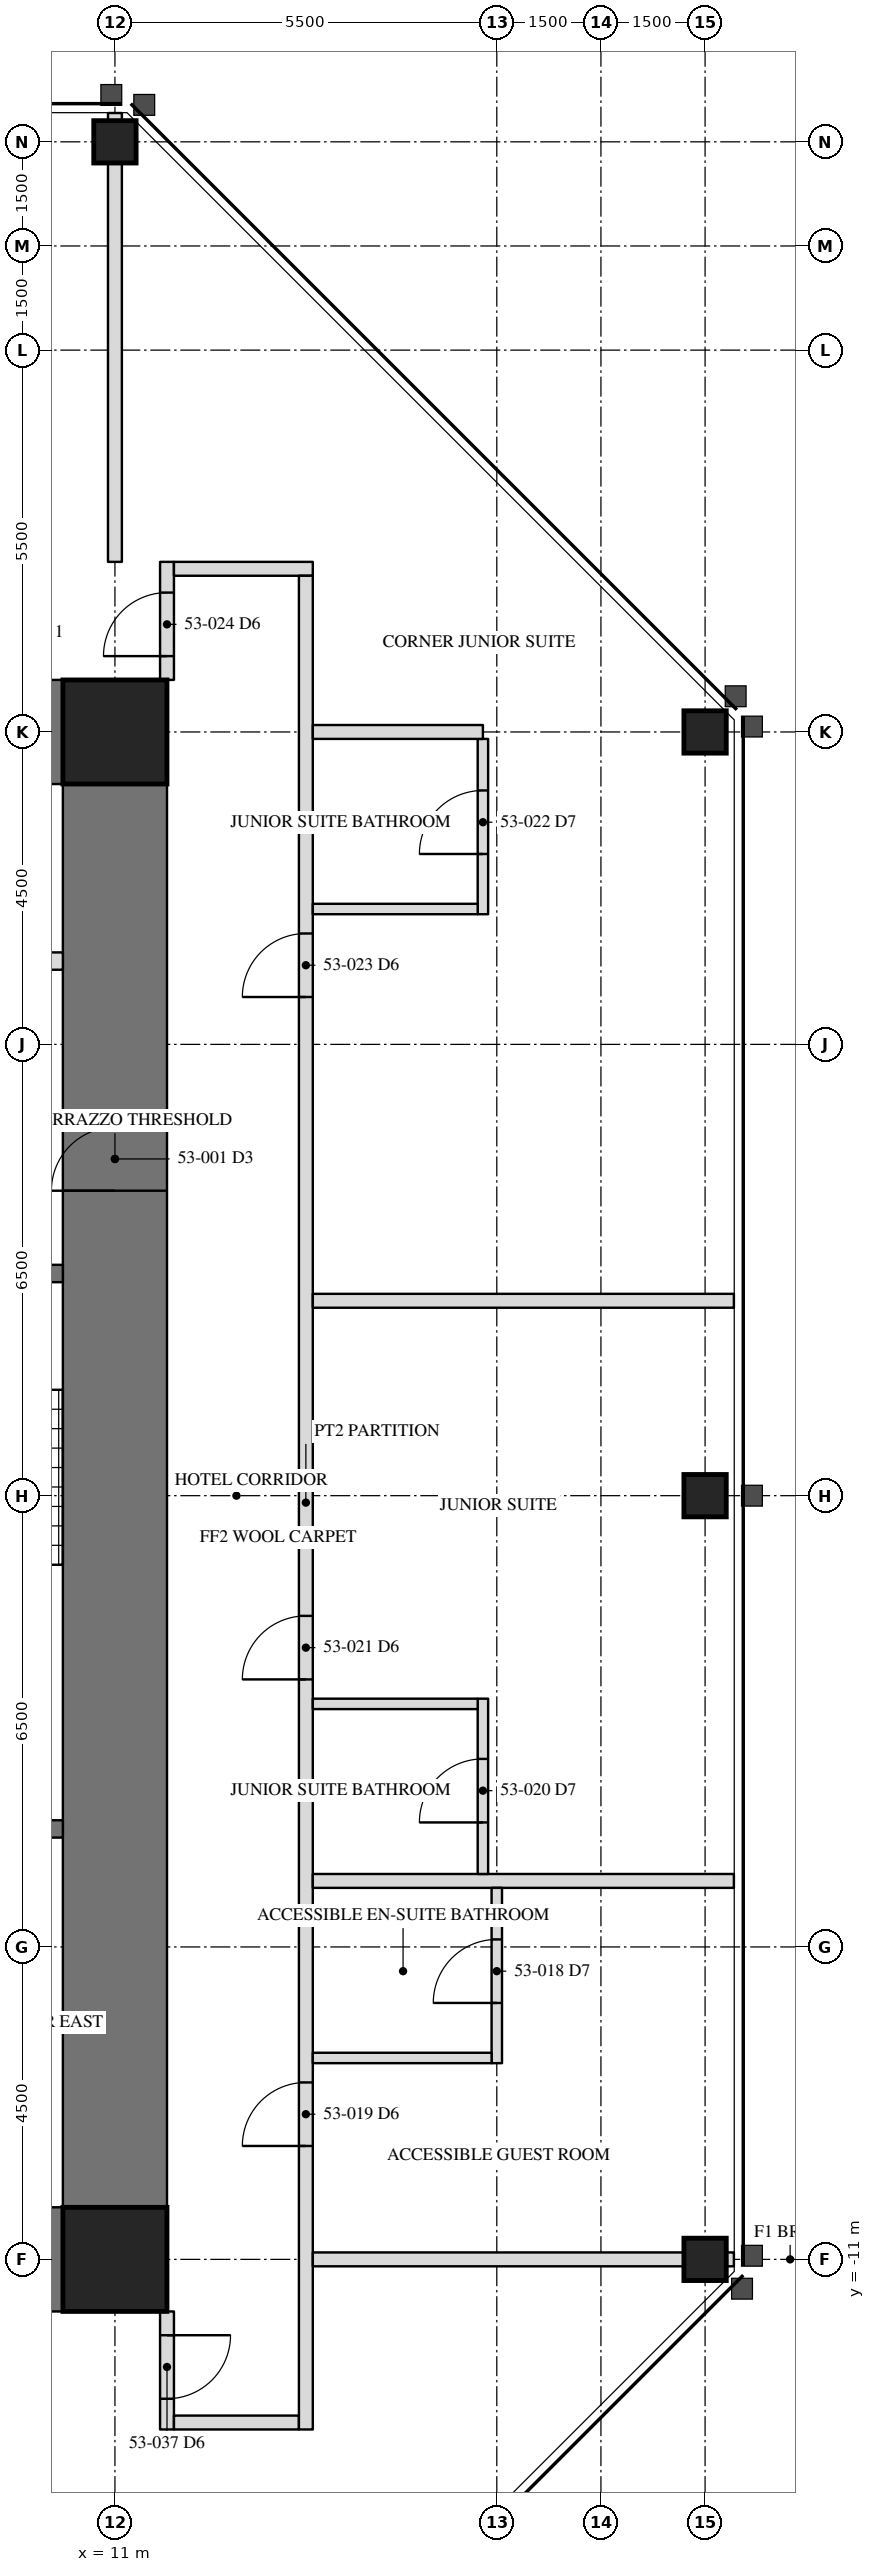
"""IFC4 building model, lengths in metres.
Left out: names, types, materials, properties, quantities, classifications, styles, units other than length and angle.
Written with IfcOpenShell. Run it as: python <this file> out.ifc"""

import sys

from ifc_helpers import new_model, si_unit, direction, frame, frame_2d, origin, origin_2d, place, context, subcontext, project, spatial, rectangle, hollow_rectangle, extrude, element, fill, save


model = new_model("IFC4")
c1 = context("Model", 3, precision=1e-05, world=origin(), true_north=direction((0.0, 1.0)))
c2 = subcontext(c1, "Body", "Model", "MODEL_VIEW")
j1 = project(units=[si_unit("LENGTHUNIT", "METRE"), si_unit("PLANEANGLEUNIT", "RADIAN")], contexts=[c1])
p1 = place(None, origin())
s1 = spatial("IfcSite", under=j1, at=p1, CompositionType="ELEMENT")
p2 = place(p1, origin())
s2 = spatial("IfcBuilding", under=s1, at=p2, CompositionType="ELEMENT")
p3 = place(p2, frame((0.0, 0.0, 222.2)))
s3 = spatial("IfcBuildingStorey", under=s2, at=p3, CompositionType="ELEMENT", Elevation=222.2)
for number, where, z_axis, x_axis in (
    (1, (19.5, -11.0, 0.0), (0.0, 0.0, 1.0), (0.0, 1.0, 0.0)),
    (2, (19.5, 0.0, 0.0), (0.0, 0.0, 1.0), (0.0, 1.0, 0.0)),
    (3, (19.5, 11.0, 0.0), (0.0, 0.0, 1.0), (0.0, 1.0, 0.0)),
    (4, (11.0, 19.5, 0.0), (0.0, 0.0, 1.0), (1.0, 0.0, 0.0)),
):
    element("IfcColumn", number, at=place(p3, frame(where, z_axis=z_axis, x_axis=x_axis)), inside=s3, PredefinedType="COLUMN", context=c2, shape_type="SweptSolid", body=[
        extrude(hollow_rectangle(XDim=0.61, YDim=0.61, WallThickness=0.076, at=origin_2d()), origin(), (0.0, 0.0, 1.0), 3.5),
    ])
p4 = place(p3, frame((11.0, -11.0, 0.0), z_axis=(0.0, 0.0, 1.0), x_axis=(0.0, 1.0, 0.0)))
e5 = element("IfcWall", 5, at=p4, inside=s3, PredefinedType="SHEAR", context=c2, shape_type="SweptSolid", body=[
    extrude(rectangle(XDim=22.0, YDim=1.5, at=frame_2d((11.0, 0.0))), origin(), (0.0, 0.0, 1.0), 3.5),
])
p5 = place(p4, frame((15.393, 0.0, 0.0)))
e6 = element("IfcOpeningElement", 6, at=p5, cuts=e5, PredefinedType="OPENING", context=c2, shape_type="SweptSolid", body=[
    extrude(rectangle(XDim=0.915, YDim=2.134, at=frame_2d((0.458, 1.067))), frame((0.0, 0.76, 0.0), z_axis=(0.0, -1.0, 0.0), x_axis=(1.0, 0.0, 0.0)), (0.0, 0.0, 1.0), 1.52),
])
for number, where, z_axis, x_axis in (
    (7, (11.0, 11.0, 0.0), (0.0, 0.0, 1.0), (-1.0, 0.0, 0.0)),
    (8, (6.5, -11.0, 0.0), (0.0, 0.0, 1.0), (1.0, 0.0, 0.0)),
):
    element("IfcWall", number, at=place(p3, frame(where, z_axis=z_axis, x_axis=x_axis)), inside=s3, PredefinedType="SHEAR", context=c2, shape_type="SweptSolid", body=[
        extrude(rectangle(XDim=4.5, YDim=1.5, at=frame_2d((2.25, 0.0))), origin(), (0.0, 0.0, 1.0), 3.5),
    ])
for number, where, z_axis, x_axis in (
    (9, (11.0, 11.0, 0.0), (0.0, 0.0, 1.0), (1.0, 0.0, 0.0)),
    (10, (11.0, -11.0, 0.0), (0.0, 0.0, 1.0), (1.0, 0.0, 0.0)),
):
    element("IfcColumn", number, at=place(p3, frame(where, z_axis=z_axis, x_axis=x_axis)), inside=s3, PredefinedType="COLUMN", context=c2, shape_type="SweptSolid", body=[
        extrude(hollow_rectangle(XDim=1.499, YDim=1.499, WallThickness=0.102, at=origin_2d()), origin(), (0.0, 0.0, 1.0), 3.5),
    ])
p6 = place(p3, frame((6.95, -4.8, 0.0), z_axis=(0.0, 0.0, 1.0), x_axis=(1.0, 0.0, 0.0)))
e11 = element("IfcWall", 11, at=p6, inside=s3, PredefinedType="SOLIDWALL", context=c2, shape_type="SweptSolid", body=[
    extrude(rectangle(XDim=3.3, YDim=0.25, at=frame_2d((1.65, 0.0))), origin(), (0.0, 0.0, 1.0), 3.31),
])
p7 = place(p3, frame((6.95, 3.2, 0.0), z_axis=(0.0, 0.0, 1.0), x_axis=(1.0, 0.0, 0.0)))
e12 = element("IfcWall", 12, at=p7, inside=s3, PredefinedType="SOLIDWALL", context=c2, shape_type="SweptSolid", body=[
    extrude(rectangle(XDim=3.3, YDim=0.25, at=frame_2d((1.65, 0.0))), origin(), (0.0, 0.0, 1.0), 3.31),
])
p8 = place(p7, frame((1.116, 0.0, 0.0)))
e13 = element("IfcOpeningElement", 13, at=p8, cuts=e12, PredefinedType="OPENING", context=c2, shape_type="SweptSolid", body=[
    extrude(rectangle(XDim=1.067, YDim=2.134, at=frame_2d((0.533, 1.067))), frame((0.0, 0.135, 0.0), z_axis=(0.0, -1.0, 0.0), x_axis=(1.0, 0.0, 0.0)), (0.0, 0.0, 1.0), 0.27),
])
p9 = place(p3, frame((6.95, 7.7, 0.0), z_axis=(0.0, 0.0, 1.0), x_axis=(1.0, 0.0, 0.0)))
e14 = element("IfcWall", 14, at=p9, inside=s3, PredefinedType="PARTITIONING", context=c2, shape_type="SweptSolid", body=[
    extrude(rectangle(XDim=3.3, YDim=0.25, at=frame_2d((1.65, 0.0))), origin(), (0.0, 0.0, 1.0), 3.31),
])
p10 = place(p9, frame((0.45, 0.0, 0.0)))
e15 = element("IfcOpeningElement", 15, at=p10, cuts=e14, PredefinedType="OPENING", context=c2, shape_type="SweptSolid", body=[
    extrude(rectangle(XDim=1.219, YDim=2.134, at=frame_2d((0.609, 1.067))), frame((0.0, 0.135, 0.0), z_axis=(0.0, -1.0, 0.0), x_axis=(1.0, 0.0, 0.0)), (0.0, 0.0, 1.0), 0.27),
])
p11 = place(p3, frame((11.75, 11.75, 0.0), z_axis=(0.0, 0.0, 1.0), x_axis=(0.0, 1.0, 0.0)))
e16 = element("IfcWall", 16, at=p11, inside=s3, PredefinedType="PARTITIONING", context=c2, shape_type="SweptSolid", body=[
    extrude(rectangle(XDim=1.7, YDim=0.2, at=frame_2d((0.85, 0.0))), origin(), (0.0, 0.0, 1.0), 3.31),
])
p12 = place(p11, frame((0.343, 0.0, 0.0)))
e17 = element("IfcOpeningElement", 17, at=p12, cuts=e16, PredefinedType="OPENING", context=c2, shape_type="SweptSolid", body=[
    extrude(rectangle(XDim=0.915, YDim=2.134, at=frame_2d((0.458, 1.067))), frame((0.0, 0.11, 0.0), z_axis=(0.0, -1.0, 0.0), x_axis=(1.0, 0.0, 0.0)), (0.0, 0.0, 1.0), 0.22),
])
p13 = place(p3, frame((13.85, 13.35, 0.0), z_axis=(0.0, 0.0, 1.0), x_axis=(-1.0, 0.0, 0.0)))
e18 = element("IfcWall", 18, at=p13, inside=s3, PredefinedType="PARTITIONING", context=c2, shape_type="SweptSolid", body=[
    extrude(rectangle(XDim=2.0, YDim=0.2, at=frame_2d((1.0, 0.0))), origin(), (0.0, 0.0, 1.0), 3.31),
])
p14 = place(p3, frame((11.75, -11.75, 0.0), z_axis=(0.0, 0.0, 1.0), x_axis=(0.0, -1.0, 0.0)))
e19 = element("IfcWall", 19, at=p14, inside=s3, PredefinedType="PARTITIONING", context=c2, shape_type="SweptSolid", body=[
    extrude(rectangle(XDim=1.7, YDim=0.2, at=frame_2d((0.85, 0.0))), origin(), (0.0, 0.0, 1.0), 3.31),
])
p15 = place(p14, frame((0.343, 0.0, 0.0)))
e20 = element("IfcOpeningElement", 20, at=p15, cuts=e19, PredefinedType="OPENING", context=c2, shape_type="SweptSolid", body=[
    extrude(rectangle(XDim=0.915, YDim=2.134, at=frame_2d((0.458, 1.067))), frame((0.0, 0.11, 0.0), z_axis=(0.0, -1.0, 0.0), x_axis=(1.0, 0.0, 0.0)), (0.0, 0.0, 1.0), 0.22),
])
p16 = place(p3, frame((11.85, -13.35, 0.0), z_axis=(0.0, 0.0, 1.0), x_axis=(1.0, 0.0, 0.0)))
e21 = element("IfcWall", 21, at=p16, inside=s3, PredefinedType="PARTITIONING", context=c2, shape_type="SweptSolid", body=[
    extrude(rectangle(XDim=1.8, YDim=0.2, at=frame_2d((0.9, 0.0))), origin(), (0.0, 0.0, 1.0), 3.31),
])
p17 = place(p3, frame((13.75, -13.45, 0.0), z_axis=(0.0, 0.0, 1.0), x_axis=(0.0, 1.0, 0.0)))
e22 = element("IfcWall", 22, at=p17, inside=s3, PredefinedType="PARTITIONING", context=c2, shape_type="SweptSolid", body=[
    extrude(rectangle(XDim=26.7, YDim=0.2, at=frame_2d((13.35, 0.0))), origin(), (0.0, 0.0, 1.0), 3.31),
])
p18 = place(p17, frame((4.083, 0.0, 0.0)))
e23 = element("IfcOpeningElement", 23, at=p18, cuts=e22, PredefinedType="OPENING", context=c2, shape_type="SweptSolid", body=[
    extrude(rectangle(XDim=0.915, YDim=2.134, at=frame_2d((0.458, 1.067))), frame((0.0, 0.11, 0.0), z_axis=(0.0, -1.0, 0.0), x_axis=(1.0, 0.0, 0.0)), (0.0, 0.0, 1.0), 0.22),
])
p19 = place(p17, frame((10.803, 0.0, 0.0)))
e24 = element("IfcOpeningElement", 24, at=p19, cuts=e22, PredefinedType="OPENING", context=c2, shape_type="SweptSolid", body=[
    extrude(rectangle(XDim=0.915, YDim=2.134, at=frame_2d((0.458, 1.067))), frame((0.0, 0.11, 0.0), z_axis=(0.0, -1.0, 0.0), x_axis=(1.0, 0.0, 0.0)), (0.0, 0.0, 1.0), 0.22),
])
p20 = place(p17, frame((20.633, 0.0, 0.0)))
e25 = element("IfcOpeningElement", 25, at=p20, cuts=e22, PredefinedType="OPENING", context=c2, shape_type="SweptSolid", body=[
    extrude(rectangle(XDim=0.915, YDim=2.134, at=frame_2d((0.458, 1.067))), frame((0.0, 0.11, 0.0), z_axis=(0.0, -1.0, 0.0), x_axis=(1.0, 0.0, 0.0)), (0.0, 0.0, 1.0), 0.22),
])
p21 = place(p3, frame((13.85, -11.0, 0.0), z_axis=(0.0, 0.0, 1.0), x_axis=(1.0, 0.0, 0.0)))
e26 = element("IfcWall", 26, at=p21, inside=s3, PredefinedType="PARTITIONING", context=c2, shape_type="SweptSolid", body=[
    extrude(rectangle(XDim=6.065, YDim=0.2, at=frame_2d((3.032, 0.0))), origin(), (0.0, 0.0, 1.0), 2.802),
])
for number, where, z_axis, x_axis in (
    (27, (13.85, -5.549, 0.0), (0.0, 0.0, 1.0), (1.0, 0.0, 0.0)),
    (28, (13.85, 2.807, 0.0), (0.0, 0.0, 1.0), (1.0, 0.0, 0.0)),
):
    element("IfcWall", number, at=place(p3, frame(where, z_axis=z_axis, x_axis=x_axis)), inside=s3, PredefinedType="PARTITIONING", context=c2, shape_type="SweptSolid", body=[
        extrude(rectangle(XDim=6.065, YDim=0.2, at=frame_2d((3.032, 0.0))), origin(), (0.0, 0.0, 1.0), 3.31),
    ])
p22 = place(p3, frame((16.5, -8.174, 0.0), z_axis=(0.0, 0.0, 1.0), x_axis=(0.0, 1.0, 0.0)))
e29 = element("IfcWall", 29, at=p22, inside=s3, PredefinedType="PARTITIONING", context=c2, shape_type="SweptSolid", body=[
    extrude(rectangle(XDim=2.525, YDim=0.15, at=frame_2d((1.263, 0.0))), origin(), (0.0, 0.0, 1.0), 3.31),
])
p23 = place(p22, frame((0.867, 0.0, 0.0)))
e30 = element("IfcOpeningElement", 30, at=p23, cuts=e29, PredefinedType="OPENING", context=c2, shape_type="SweptSolid", body=[
    extrude(rectangle(XDim=0.915, YDim=2.032, at=frame_2d((0.458, 1.016))), frame((0.0, 0.085, 0.0), z_axis=(0.0, -1.0, 0.0), x_axis=(1.0, 0.0, 0.0)), (0.0, 0.0, 1.0), 0.17),
])
p24 = place(p3, frame((13.85, -8.099, 0.0), z_axis=(0.0, 0.0, 1.0), x_axis=(1.0, 0.0, 0.0)))
e31 = element("IfcWall", 31, at=p24, inside=s3, PredefinedType="PARTITIONING", context=c2, shape_type="SweptSolid", body=[
    extrude(rectangle(XDim=2.575, YDim=0.15, at=frame_2d((1.288, 0.0))), origin(), (0.0, 0.0, 1.0), 3.31),
])
p25 = place(p3, frame((16.3, -5.449, 0.0), z_axis=(0.0, 0.0, 1.0), x_axis=(0.0, 1.0, 0.0)))
e32 = element("IfcWall", 32, at=p25, inside=s3, PredefinedType="PARTITIONING", context=c2, shape_type="SweptSolid", body=[
    extrude(rectangle(XDim=2.525, YDim=0.15, at=frame_2d((1.262, 0.0))), origin(), (0.0, 0.0, 1.0), 3.31),
])
p26 = place(p25, frame((0.742, 0.0, 0.0)))
e33 = element("IfcOpeningElement", 33, at=p26, cuts=e32, PredefinedType="OPENING", context=c2, shape_type="SweptSolid", body=[
    extrude(rectangle(XDim=0.915, YDim=2.032, at=frame_2d((0.458, 1.016))), frame((0.0, 0.085, 0.0), z_axis=(0.0, -1.0, 0.0), x_axis=(1.0, 0.0, 0.0)), (0.0, 0.0, 1.0), 0.17),
])
p27 = place(p3, frame((13.85, -2.999, 0.0), z_axis=(0.0, 0.0, 1.0), x_axis=(1.0, 0.0, 0.0)))
e34 = element("IfcWall", 34, at=p27, inside=s3, PredefinedType="PARTITIONING", context=c2, shape_type="SweptSolid", body=[
    extrude(rectangle(XDim=2.375, YDim=0.15, at=frame_2d((1.188, 0.0))), origin(), (0.0, 0.0, 1.0), 3.31),
])
p28 = place(p3, frame((16.3, 8.375, 0.0), z_axis=(0.0, 0.0, 1.0), x_axis=(0.0, 1.0, 0.0)))
e35 = element("IfcWall", 35, at=p28, inside=s3, PredefinedType="PARTITIONING", context=c2, shape_type="SweptSolid", body=[
    extrude(rectangle(XDim=2.525, YDim=0.15, at=frame_2d((1.262, 0.0))), origin(), (0.0, 0.0, 1.0), 3.31),
])
p29 = place(p28, frame((0.867, 0.0, 0.0)))
e36 = element("IfcOpeningElement", 36, at=p29, cuts=e35, PredefinedType="OPENING", context=c2, shape_type="SweptSolid", body=[
    extrude(rectangle(XDim=0.915, YDim=2.032, at=frame_2d((0.458, 1.016))), frame((0.0, 0.085, 0.0), z_axis=(0.0, -1.0, 0.0), x_axis=(1.0, 0.0, 0.0)), (0.0, 0.0, 1.0), 0.17),
])
p30 = place(p3, frame((13.85, 8.45, 0.0), z_axis=(0.0, 0.0, 1.0), x_axis=(1.0, 0.0, 0.0)))
e37 = element("IfcWall", 37, at=p30, inside=s3, PredefinedType="PARTITIONING", context=c2, shape_type="SweptSolid", body=[
    extrude(rectangle(XDim=2.375, YDim=0.15, at=frame_2d((1.188, 0.0))), origin(), (0.0, 0.0, 1.0), 3.31),
])
p31 = place(p3, frame((13.85, 11.0, 0.0), z_axis=(0.0, 0.0, 1.0), x_axis=(1.0, 0.0, 0.0)))
e38 = element("IfcWall", 38, at=p31, inside=s3, PredefinedType="PARTITIONING", context=c2, shape_type="SweptSolid", body=[
    extrude(rectangle(XDim=2.45, YDim=0.2, at=frame_2d((1.225, 0.0))), origin(), (0.0, 0.0, 1.0), 2.802),
])
p32 = place(p3, frame((11.0, 13.45, 0.0), z_axis=(0.0, 0.0, 1.0), x_axis=(0.0, 1.0, 0.0)))
e39 = element("IfcWall", 39, at=p32, inside=s3, PredefinedType="PARTITIONING", context=c2, shape_type="SweptSolid", body=[
    extrude(rectangle(XDim=6.465, YDim=0.2, at=frame_2d((3.232, 0.0))), origin(), (0.0, 0.0, 1.0), 2.802),
])
p33 = place(p5, origin())
e40 = element("IfcDoor", 40, at=p33, inside=s3, OperationType="SINGLE_SWING_RIGHT", PredefinedType="DOOR", context=c2, shape_type="SweptSolid", body=[
    extrude(rectangle(XDim=0.915, YDim=2.134, at=frame_2d((0.458, 1.067))), frame((0.0, -0.675, 0.0), z_axis=(0.0, -1.0, 0.0), x_axis=(1.0, 0.0, 0.0)), (0.0, 0.0, 1.0), 0.05),
])
fill(e6, e40)
p34 = place(p23, origin())
e41 = element("IfcDoor", 41, at=p34, inside=s3, OperationType="SINGLE_SWING_LEFT", PredefinedType="DOOR", context=c2, shape_type="SweptSolid", body=[
    extrude(rectangle(XDim=0.915, YDim=2.032, at=frame_2d((0.458, 1.016))), frame((0.0, 0.025, 0.0), z_axis=(0.0, -1.0, 0.0), x_axis=(1.0, 0.0, 0.0)), (0.0, 0.0, 1.0), 0.05),
])
fill(e30, e41)
p35 = place(p18, origin())
e42 = element("IfcDoor", 42, at=p35, inside=s3, OperationType="SINGLE_SWING_LEFT", PredefinedType="DOOR", context=c2, shape_type="SweptSolid", body=[
    extrude(rectangle(XDim=0.915, YDim=2.134, at=frame_2d((0.458, 1.067))), frame((0.0, 0.025, 0.0), z_axis=(0.0, -1.0, 0.0), x_axis=(1.0, 0.0, 0.0)), (0.0, 0.0, 1.0), 0.05),
])
fill(e23, e42)
p36 = place(p26, origin())
e43 = element("IfcDoor", 43, at=p36, inside=s3, OperationType="SINGLE_SWING_LEFT", PredefinedType="DOOR", context=c2, shape_type="SweptSolid", body=[
    extrude(rectangle(XDim=0.915, YDim=2.032, at=frame_2d((0.458, 1.016))), frame((0.0, 0.025, 0.0), z_axis=(0.0, -1.0, 0.0), x_axis=(1.0, 0.0, 0.0)), (0.0, 0.0, 1.0), 0.05),
])
fill(e33, e43)
p37 = place(p19, origin())
e44 = element("IfcDoor", 44, at=p37, inside=s3, OperationType="SINGLE_SWING_LEFT", PredefinedType="DOOR", context=c2, shape_type="SweptSolid", body=[
    extrude(rectangle(XDim=0.915, YDim=2.134, at=frame_2d((0.458, 1.067))), frame((0.0, 0.025, 0.0), z_axis=(0.0, -1.0, 0.0), x_axis=(1.0, 0.0, 0.0)), (0.0, 0.0, 1.0), 0.05),
])
fill(e24, e44)
p38 = place(p29, origin())
e45 = element("IfcDoor", 45, at=p38, inside=s3, OperationType="SINGLE_SWING_LEFT", PredefinedType="DOOR", context=c2, shape_type="SweptSolid", body=[
    extrude(rectangle(XDim=0.915, YDim=2.032, at=frame_2d((0.458, 1.016))), frame((0.0, 0.025, 0.0), z_axis=(0.0, -1.0, 0.0), x_axis=(1.0, 0.0, 0.0)), (0.0, 0.0, 1.0), 0.05),
])
fill(e36, e45)
p39 = place(p20, origin())
e46 = element("IfcDoor", 46, at=p39, inside=s3, OperationType="SINGLE_SWING_LEFT", PredefinedType="DOOR", context=c2, shape_type="SweptSolid", body=[
    extrude(rectangle(XDim=0.915, YDim=2.134, at=frame_2d((0.458, 1.067))), frame((0.0, 0.025, 0.0), z_axis=(0.0, -1.0, 0.0), x_axis=(1.0, 0.0, 0.0)), (0.0, 0.0, 1.0), 0.05),
])
fill(e25, e46)
p40 = place(p12, origin())
e47 = element("IfcDoor", 47, at=p40, inside=s3, OperationType="SINGLE_SWING_LEFT", PredefinedType="DOOR", context=c2, shape_type="SweptSolid", body=[
    extrude(rectangle(XDim=0.915, YDim=2.134, at=frame_2d((0.458, 1.067))), frame((0.0, 0.025, 0.0), z_axis=(0.0, -1.0, 0.0), x_axis=(1.0, 0.0, 0.0)), (0.0, 0.0, 1.0), 0.05),
])
fill(e17, e47)
p41 = place(p15, origin())
e48 = element("IfcDoor", 48, at=p41, inside=s3, OperationType="SINGLE_SWING_LEFT", PredefinedType="DOOR", context=c2, shape_type="SweptSolid", body=[
    extrude(rectangle(XDim=0.915, YDim=2.134, at=frame_2d((0.458, 1.067))), frame((0.0, 0.025, 0.0), z_axis=(0.0, -1.0, 0.0), x_axis=(1.0, 0.0, 0.0)), (0.0, 0.0, 1.0), 0.05),
])
fill(e20, e48)
save(model, sys.argv[1])
